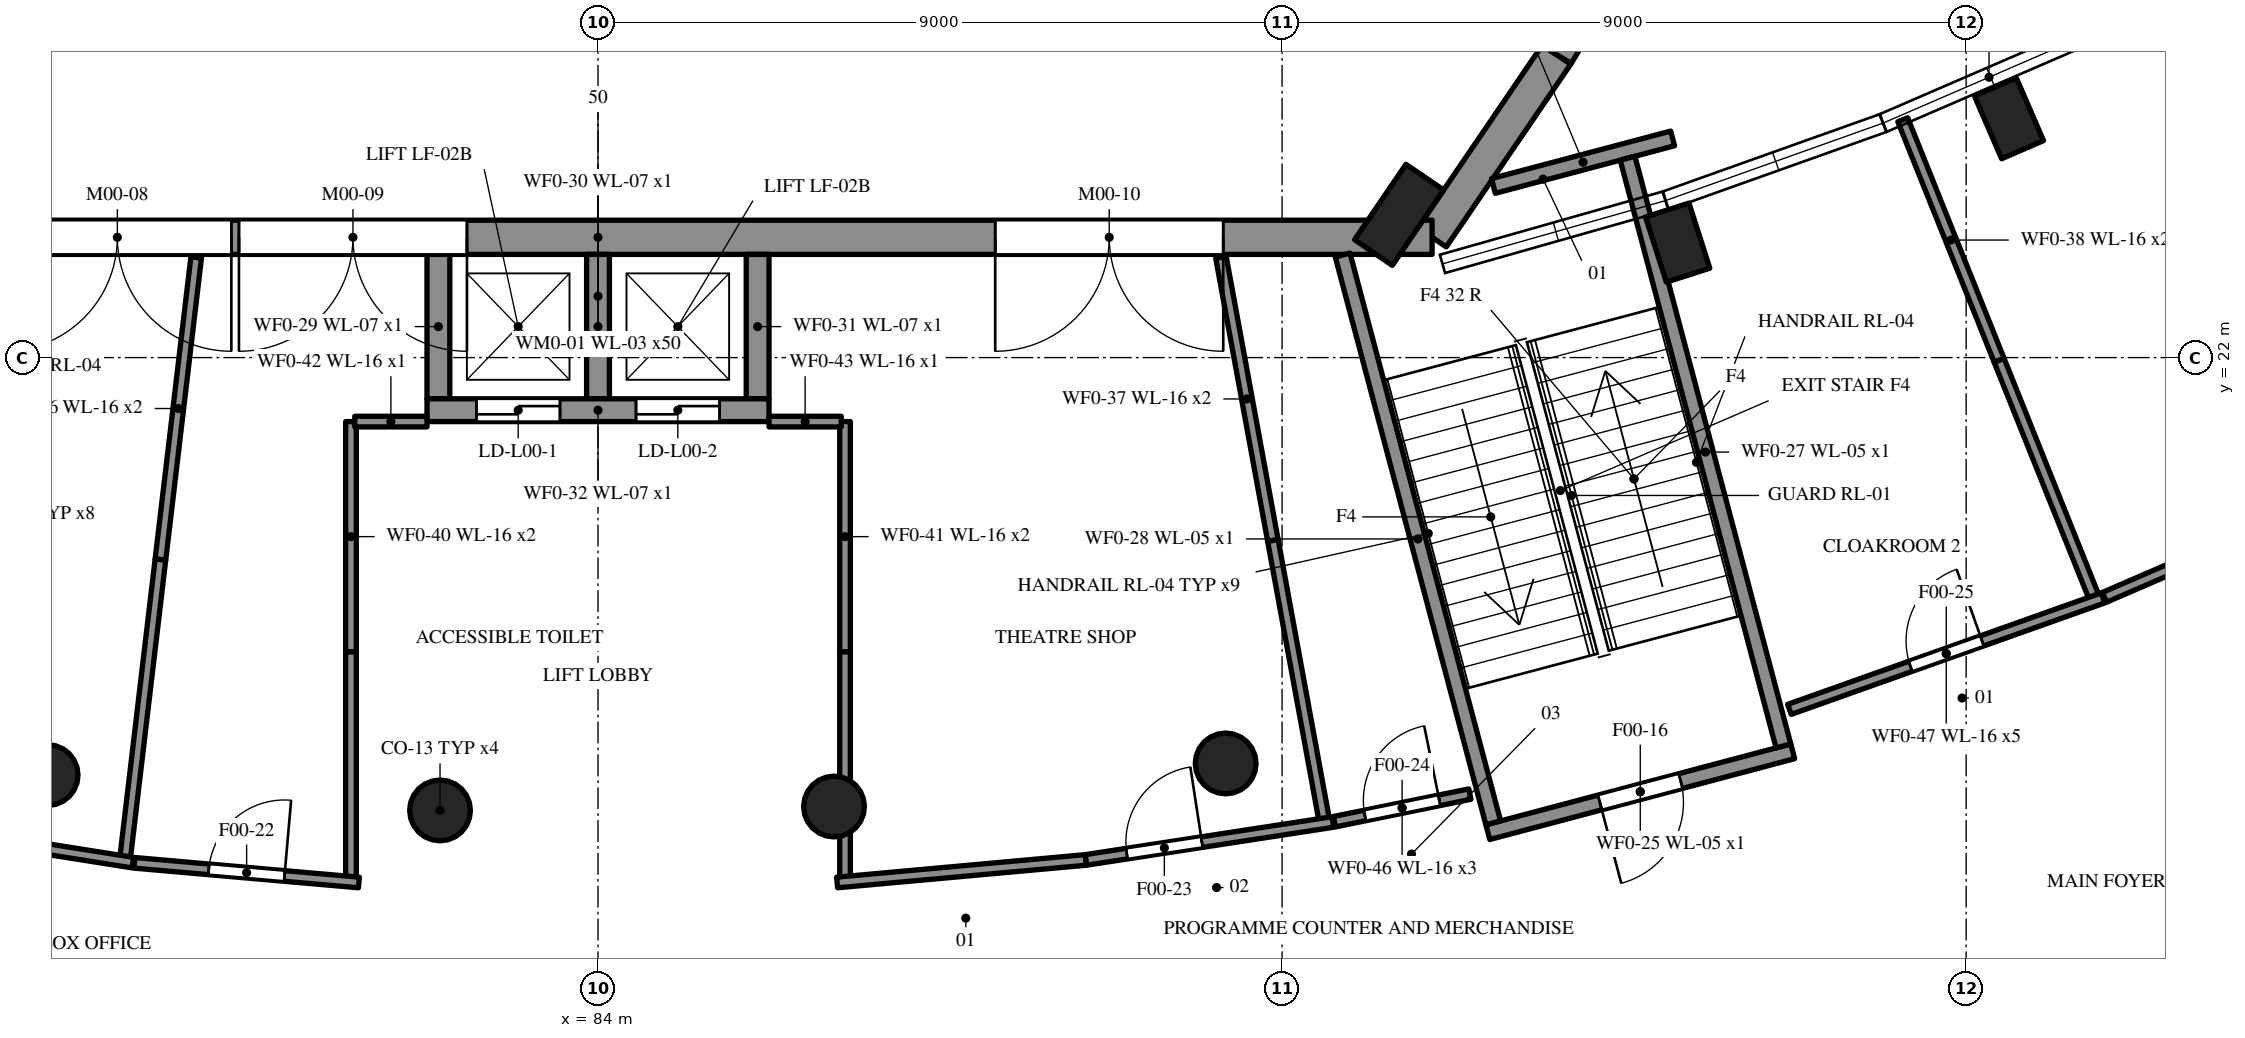
"""IFC4 building model, lengths in metres.
Left out: names, types, materials, properties, quantities, classifications, styles, units other than length and angle.
Written with IfcOpenShell. Run it as: python <this file> out.ifc"""

import sys

from ifc_helpers import new_model, si_unit, direction, frame, frame_2d, origin, origin_2d, place, context, subcontext, project, spatial, rectangle, circle, extrude, element, fill, save


model = new_model("IFC4")
c1 = context("Model", 3, precision=1e-05, world=origin(), true_north=direction((0.0, 1.0)))
c2 = subcontext(c1, "Body", "Model", "MODEL_VIEW")
j1 = project(units=[si_unit("LENGTHUNIT", "METRE"), si_unit("PLANEANGLEUNIT", "RADIAN")], contexts=[c1])
p1 = place(None, origin())
s1 = spatial("IfcSite", under=j1, at=p1, CompositionType="ELEMENT")
p2 = place(p1, origin())
s2 = spatial("IfcBuilding", under=s1, at=p2, CompositionType="ELEMENT")
p3 = place(p2, origin())
s3 = spatial("IfcBuildingStorey", under=s2, at=p3, CompositionType="ELEMENT", Elevation=0.0)
p4 = place(p3, frame((94.974, 23.583, 0.0), z_axis=(0.0, 0.0, 1.0), x_axis=(0.5629642644, 0.826481238147, 0.0)))
e1 = element("IfcWall", 1, at=p4, inside=s3, PredefinedType="SOLIDWALL", context=c2, shape_type="SweptSolid", body=[
    extrude(rectangle(XDim=2.908, YDim=0.45, at=frame_2d((1.454, 0.0))), origin(), (0.0, 0.0, 1.0), 5.4),
])
p5 = place(p3, frame((96.611, 25.986, 0.0), z_axis=(0.0, 0.0, 1.0), x_axis=(0.515636119523, 0.856807675177, 0.0)))
e2 = element("IfcWall", 2, at=p5, inside=s3, PredefinedType="SOLIDWALL", context=c2, shape_type="SweptSolid", body=[
    extrude(rectangle(XDim=3.021, YDim=0.45, at=frame_2d((1.511, 0.0))), origin(), (0.0, 0.0, 1.0), 5.4),
])
p6 = place(p3, frame((73.026, 23.583, 0.0), z_axis=(0.0, 0.0, 1.0), x_axis=(1.0, 0.0, 0.0)))
e3 = element("IfcWall", 3, at=p6, inside=s3, PredefinedType="SOLIDWALL", context=c2, shape_type="SweptSolid", body=[
    extrude(rectangle(XDim=21.948, YDim=0.45, at=frame_2d((10.974, 0.0))), origin(), (0.0, 0.0, 1.0), 5.4),
])
p7 = place(p6, frame((3.15, 0.0, 0.0)))
e4 = element("IfcOpeningElement", 4, at=p7, cuts=e3, PredefinedType="OPENING", context=c2, shape_type="SweptSolid", body=[
    extrude(rectangle(XDim=3.0, YDim=3.0, at=frame_2d((1.5, 1.5))), frame((0.0, 0.235, 0.0), z_axis=(0.0, -1.0, 0.0), x_axis=(1.0, 0.0, 0.0)), (0.0, 0.0, 1.0), 0.47),
])
p8 = place(p6, frame((6.25, 0.0, 0.0)))
e5 = element("IfcOpeningElement", 5, at=p8, cuts=e3, PredefinedType="OPENING", context=c2, shape_type="SweptSolid", body=[
    extrude(rectangle(XDim=3.0, YDim=3.0, at=frame_2d((1.5, 1.5))), frame((0.0, 0.235, 0.0), z_axis=(0.0, -1.0, 0.0), x_axis=(1.0, 0.0, 0.0)), (0.0, 0.0, 1.0), 0.47),
])
p9 = place(p6, frame((16.2, 0.0, 0.0)))
e6 = element("IfcOpeningElement", 6, at=p9, cuts=e3, PredefinedType="OPENING", context=c2, shape_type="SweptSolid", body=[
    extrude(rectangle(XDim=3.0, YDim=3.0, at=frame_2d((1.5, 1.5))), frame((0.0, 0.235, 0.0), z_axis=(0.0, -1.0, 0.0), x_axis=(1.0, 0.0, 0.0)), (0.0, 0.0, 1.0), 0.47),
])
p10 = place(p3, frame((94.54, 23.878, 0.0), z_axis=(0.0, 0.0, 1.0), x_axis=(0.562978035902, 0.82647185741, 0.0)))
e7 = element("IfcColumn", 7, at=p10, inside=s3, PredefinedType="PILASTER", context=c2, shape_type="SweptSolid", body=[
    extrude(rectangle(XDim=1.2, YDim=0.6, at=origin_2d()), origin(), (0.0, 0.0, 1.0), 5.4),
])
for number, where, z_axis, x_axis in (
    (8, (98.205, 23.513, 0.0), (0.0, 0.0, 1.0), (0.304, -0.953, 0.0)),
    (9, (102.563, 25.148, 0.0), (0.0, 0.0, 1.0), (0.398, -0.918, 0.0)),
):
    element("IfcColumn", number, at=place(p3, frame(where, z_axis=z_axis, x_axis=x_axis)), inside=s3, PredefinedType="PILASTER", context=c2, shape_type="SweptSolid", body=[
        extrude(rectangle(XDim=0.9, YDim=0.6, at=origin_2d()), origin(), (0.0, 0.0, 1.0), 5.4),
    ])
for number, where, z_axis, x_axis in (
    (10, (76.759, 16.507, 0.0), (0.0, 0.0, 1.0), (1.0, 0.0, 0.0)),
    (11, (81.922, 16.042, 0.0), (0.0, 0.0, 1.0), (1.0, 0.0, 0.0)),
    (12, (87.105, 16.093, 0.0), (0.0, 0.0, 1.0), (1.0, 0.0, 0.0)),
    (13, (92.258, 16.66, 0.0), (0.0, 0.0, 1.0), (1.0, 0.0, 0.0)),
):
    element("IfcColumn", number, at=place(p3, frame(where, z_axis=z_axis, x_axis=x_axis)), inside=s3, PredefinedType="COLUMN", context=c2, shape_type="SweptSolid", body=[
        extrude(circle(Radius=0.4, at=origin_2d()), origin(), (0.0, 0.0, 1.0), 5.4),
    ])
p11 = place(p3, frame((99.718, 16.819, 0.0), z_axis=(0.0, 0.0, 1.0), x_axis=(-0.966590417756, -0.256325894715, 0.0)))
e14 = element("IfcWall", 14, at=p11, inside=s3, PredefinedType="SHEAR", context=c2, shape_type="SweptSolid", body=[
    extrude(rectangle(XDim=4.15, YDim=0.2, at=frame_2d((2.075, 0.0))), origin(), (0.0, 0.0, 1.0), 5.4),
])
p12 = place(p11, frame((1.525, 0.0, 0.0)))
e15 = element("IfcOpeningElement", 15, at=p12, cuts=e14, PredefinedType="OPENING", context=c2, shape_type="SweptSolid", body=[
    extrude(rectangle(XDim=1.1, YDim=2.1, at=frame_2d((0.55, 1.05))), frame((0.0, 0.11, 0.0), z_axis=(0.0, -1.0, 0.0), x_axis=(1.0, 0.0, 0.0)), (0.0, 0.0, 1.0), 0.22),
])
p13 = place(p3, frame((98.138, 24.884, 0.0), z_axis=(0.0, 0.0, 1.0), x_axis=(-0.966582812495, -0.256354572009, 0.0)))
e16 = element("IfcWall", 16, at=p13, inside=s3, PredefinedType="SHEAR", context=c2, shape_type="SweptSolid", body=[
    extrude(rectangle(XDim=2.44, YDim=0.2, at=frame_2d((1.22, 0.0))), origin(), (0.0, 0.0, 1.0), 5.4),
])
p14 = place(p3, frame((99.596, 16.89, 0.0), z_axis=(0.0, 0.0, 1.0), x_axis=(-0.25631948932, 0.966592116352, 0.0)))
e17 = element("IfcWall", 17, at=p14, inside=s3, PredefinedType="SHEAR", context=c2, shape_type="SweptSolid", body=[
    extrude(rectangle(XDim=8.0, YDim=0.2, at=frame_2d((4.0, 0.0))), origin(), (0.0, 0.0, 1.0), 5.4),
])
p15 = place(p3, frame((95.778, 15.878, 0.0), z_axis=(0.0, 0.0, 1.0), x_axis=(-0.256333531377, 0.966588392591, 0.0)))
e18 = element("IfcWall", 18, at=p15, inside=s3, PredefinedType="SHEAR", context=c2, shape_type="SweptSolid", body=[
    extrude(rectangle(XDim=7.73, YDim=0.2, at=frame_2d((3.865, 0.0))), origin(), (0.0, 0.0, 1.0), 5.4),
])
for number, where, z_axis, x_axis in (
    (19, (81.9, 21.458, -1.1), (0.0, 0.0, 1.0), (0.0, 1.0, 0.0)),
    (20, (84.0, 21.458, -1.1), (0.0, 0.0, 1.0), (0.0, 1.0, 0.0)),
    (21, (86.1, 21.458, -1.1), (0.0, 0.0, 1.0), (0.0, 1.0, 0.0)),
):
    element("IfcWall", number, at=place(p3, frame(where, z_axis=z_axis, x_axis=x_axis)), inside=s3, PredefinedType="SHEAR", context=c2, shape_type="SweptSolid", body=[
        extrude(rectangle(XDim=1.9, YDim=0.3, at=frame_2d((0.95, 0.0))), origin(), (0.0, 0.0, 1.0), 6.5),
    ])
p16 = place(p3, frame((81.75, 21.308, -1.1), z_axis=(0.0, 0.0, 1.0), x_axis=(1.0, 0.0, 0.0)))
e22 = element("IfcWall", 22, at=p16, inside=s3, PredefinedType="SHEAR", context=c2, shape_type="SweptSolid", body=[
    extrude(rectangle(XDim=4.5, YDim=0.3, at=frame_2d((2.25, 0.0))), origin(), (0.0, 0.0, 1.0), 6.5),
])
p17 = place(p16, frame((0.65, 0.0, 1.1)))
e23 = element("IfcOpeningElement", 23, at=p17, cuts=e22, PredefinedType="OPENING", context=c2, shape_type="SweptSolid", body=[
    extrude(rectangle(XDim=1.1, YDim=2.2, at=frame_2d((0.55, 1.1))), frame((0.0, 0.16, 0.0), z_axis=(0.0, -1.0, 0.0), x_axis=(1.0, 0.0, 0.0)), (0.0, 0.0, 1.0), 0.32),
])
p18 = place(p16, frame((2.75, 0.0, 1.1)))
e24 = element("IfcOpeningElement", 24, at=p18, cuts=e22, PredefinedType="OPENING", context=c2, shape_type="SweptSolid", body=[
    extrude(rectangle(XDim=1.1, YDim=2.2, at=frame_2d((0.55, 1.1))), frame((0.0, 0.16, 0.0), z_axis=(0.0, -1.0, 0.0), x_axis=(1.0, 0.0, 0.0)), (0.0, 0.0, 1.0), 0.32),
])
p19 = place(p3, frame((78.713, 23.318, 0.0), z_axis=(0.0, 0.0, 1.0), x_axis=(-0.117524162316, -0.993070023348, 0.0)))
e25 = element("IfcWall", 25, at=p19, inside=s3, PredefinedType="PARTITIONING", context=c2, shape_type="SweptSolid", body=[
    extrude(rectangle(XDim=4.003, YDim=0.14, at=frame_2d((2.001, 0.0))), origin(), (0.0, 0.0, 1.0), 5.18),
])
p20 = place(p3, frame((78.243, 19.342, 0.0), z_axis=(0.0, 0.0, 1.0), x_axis=(-0.117462752038, -0.993077288978, 0.0)))
e26 = element("IfcWall", 26, at=p20, inside=s3, PredefinedType="PARTITIONING", context=c2, shape_type="SweptSolid", body=[
    extrude(rectangle(XDim=3.943, YDim=0.14, at=frame_2d((1.971, 0.0))), origin(), (0.0, 0.0, 1.0), 5.18),
])
p21 = place(p3, frame((92.196, 23.318, 0.0), z_axis=(0.0, 0.0, 1.0), x_axis=(0.180428728445, -0.983588061107, 0.0)))
e27 = element("IfcWall", 27, at=p21, inside=s3, PredefinedType="PARTITIONING", context=c2, shape_type="SweptSolid", body=[
    extrude(rectangle(XDim=3.786, YDim=0.14, at=frame_2d((1.893, 0.0))), origin(), (0.0, 0.0, 1.0), 5.18),
])
p22 = place(p3, frame((92.879, 19.594, 0.0), z_axis=(0.0, 0.0, 1.0), x_axis=(0.18037858071, -0.983597258852, 0.0)))
e28 = element("IfcWall", 28, at=p22, inside=s3, PredefinedType="PARTITIONING", context=c2, shape_type="SweptSolid", body=[
    extrude(rectangle(XDim=3.726, YDim=0.14, at=frame_2d((1.863, 0.0))), origin(), (0.0, 0.0, 1.0), 5.18),
])
p23 = place(p3, frame((101.167, 25.129, 0.0), z_axis=(0.0, 0.0, 1.0), x_axis=(0.371736295653, -0.928338368535, 0.0)))
e29 = element("IfcWall", 29, at=p23, inside=s3, PredefinedType="PARTITIONING", context=c2, shape_type="SweptSolid", body=[
    extrude(rectangle(XDim=3.41, YDim=0.14, at=frame_2d((1.705, 0.0))), origin(), (0.0, 0.0, 1.0), 5.18),
])
p24 = place(p3, frame((102.434, 21.964, 0.0), z_axis=(0.0, 0.0, 1.0), x_axis=(0.371667085719, -0.928366079407, 0.0)))
e30 = element("IfcWall", 30, at=p24, inside=s3, PredefinedType="PARTITIONING", context=c2, shape_type="SweptSolid", body=[
    extrude(rectangle(XDim=3.35, YDim=0.14, at=frame_2d((1.675, 0.0))), origin(), (0.0, 0.0, 1.0), 5.18),
])
p25 = place(p3, frame((80.75, 15.163, 0.0), z_axis=(0.0, 0.0, 1.0), x_axis=(0.0, 1.0, 0.0)))
e31 = element("IfcWall", 31, at=p25, inside=s3, PredefinedType="PARTITIONING", context=c2, shape_type="SweptSolid", body=[
    extrude(rectangle(XDim=2.967, YDim=0.14, at=frame_2d((1.484, 0.0))), origin(), (0.0, 0.0, 1.0), 5.18),
])
p26 = place(p3, frame((80.75, 18.13, 0.0), z_axis=(0.0, 0.0, 1.0), x_axis=(0.0, 1.0, 0.0)))
e32 = element("IfcWall", 32, at=p26, inside=s3, PredefinedType="PARTITIONING", context=c2, shape_type="SweptSolid", body=[
    extrude(rectangle(XDim=3.027, YDim=0.14, at=frame_2d((1.514, 0.0))), origin(), (0.0, 0.0, 1.0), 5.18),
])
p27 = place(p3, frame((87.25, 15.163, 0.0), z_axis=(0.0, 0.0, 1.0), x_axis=(0.0, 1.0, 0.0)))
e33 = element("IfcWall", 33, at=p27, inside=s3, PredefinedType="PARTITIONING", context=c2, shape_type="SweptSolid", body=[
    extrude(rectangle(XDim=2.967, YDim=0.14, at=frame_2d((1.484, 0.0))), origin(), (0.0, 0.0, 1.0), 5.18),
])
p28 = place(p3, frame((87.25, 18.13, 0.0), z_axis=(0.0, 0.0, 1.0), x_axis=(0.0, 1.0, 0.0)))
e34 = element("IfcWall", 34, at=p28, inside=s3, PredefinedType="PARTITIONING", context=c2, shape_type="SweptSolid", body=[
    extrude(rectangle(XDim=3.027, YDim=0.14, at=frame_2d((1.514, 0.0))), origin(), (0.0, 0.0, 1.0), 5.18),
])
for number, where, z_axis, x_axis in (
    (35, (80.8, 21.158, 0.0), (0.0, 0.0, 1.0), (1.0, 0.0, 0.0)),
    (36, (86.25, 21.158, 0.0), (0.0, 0.0, 1.0), (1.0, 0.0, 0.0)),
):
    element("IfcWall", number, at=place(p3, frame(where, z_axis=z_axis, x_axis=x_axis)), inside=s3, PredefinedType="PARTITIONING", context=c2, shape_type="SweptSolid", body=[
        extrude(rectangle(XDim=0.95, YDim=0.14, at=frame_2d((0.475, 0.0))), origin(), (0.0, 0.0, 1.0), 5.18),
    ])
p29 = place(p3, frame((73.554, 16.04, 0.0), z_axis=(0.0, 0.0, 1.0), x_axis=(0.987693268679, -0.156403347173, 0.0)))
e37 = element("IfcWall", 37, at=p29, inside=s3, PredefinedType="PARTITIONING", context=c2, shape_type="SweptSolid", body=[
    extrude(rectangle(XDim=4.38, YDim=0.14, at=frame_2d((2.19, 0.0))), origin(), (0.0, 0.0, 1.0), 5.18),
])
p30 = place(p29, frame((1.59, 0.0, 0.0)))
e38 = element("IfcOpeningElement", 38, at=p30, cuts=e37, PredefinedType="OPENING", context=c2, shape_type="SweptSolid", body=[
    extrude(rectangle(XDim=1.0, YDim=2.1, at=frame_2d((0.5, 1.05))), frame((0.0, 0.08, 0.0), z_axis=(0.0, -1.0, 0.0), x_axis=(1.0, 0.0, 0.0)), (0.0, 0.0, 1.0), 0.16),
])
p31 = place(p3, frame((77.9, 15.352, 0.0), z_axis=(0.0, 0.0, 1.0), x_axis=(0.996183521579, -0.087283396667, 0.0)))
e39 = element("IfcWall", 39, at=p31, inside=s3, PredefinedType="PARTITIONING", context=c2, shape_type="SweptSolid", body=[
    extrude(rectangle(XDim=2.965, YDim=0.14, at=frame_2d((1.482, 0.0))), origin(), (0.0, 0.0, 1.0), 5.18),
])
p32 = place(p31, frame((0.982, 0.0, 0.0)))
e40 = element("IfcOpeningElement", 40, at=p32, cuts=e39, PredefinedType="OPENING", context=c2, shape_type="SweptSolid", body=[
    extrude(rectangle(XDim=1.0, YDim=2.1, at=frame_2d((0.5, 1.05))), frame((0.0, 0.08, 0.0), z_axis=(0.0, -1.0, 0.0), x_axis=(1.0, 0.0, 0.0)), (0.0, 0.0, 1.0), 0.16),
])
p33 = place(p3, frame((87.146, 15.094, 0.0), z_axis=(0.0, 0.0, 1.0), x_axis=(0.995913271916, 0.090314754169, 0.0)))
e41 = element("IfcWall", 41, at=p33, inside=s3, PredefinedType="PARTITIONING", context=c2, shape_type="SweptSolid", body=[
    extrude(rectangle(XDim=3.287, YDim=0.14, at=frame_2d((1.644, 0.0))), origin(), (0.0, 0.0, 1.0), 5.18),
])
p34 = place(p3, frame((90.42, 15.39, 0.0), z_axis=(0.0, 0.0, 1.0), x_axis=(0.988407735118, 0.151822755736, 0.0)))
e42 = element("IfcWall", 42, at=p34, inside=s3, PredefinedType="PARTITIONING", context=c2, shape_type="SweptSolid", body=[
    extrude(rectangle(XDim=3.287, YDim=0.14, at=frame_2d((1.644, 0.0))), origin(), (0.0, 0.0, 1.0), 5.18),
])
p35 = place(p34, frame((0.543, 0.0, 0.0)))
e43 = element("IfcOpeningElement", 43, at=p35, cuts=e42, PredefinedType="OPENING", context=c2, shape_type="SweptSolid", body=[
    extrude(rectangle(XDim=1.0, YDim=2.1, at=frame_2d((0.5, 1.05))), frame((0.0, 0.08, 0.0), z_axis=(0.0, -1.0, 0.0), x_axis=(1.0, 0.0, 0.0)), (0.0, 0.0, 1.0), 0.16),
])
p36 = place(p3, frame((93.688, 15.893, 0.0), z_axis=(0.0, 0.0, 1.0), x_axis=(0.979888212279, 0.199547216058, 0.0)))
e44 = element("IfcWall", 44, at=p36, inside=s3, PredefinedType="PARTITIONING", context=c2, shape_type="SweptSolid", body=[
    extrude(rectangle(XDim=1.819, YDim=0.14, at=frame_2d((0.91, 0.0))), origin(), (0.0, 0.0, 1.0), 5.18),
])
p37 = place(p36, frame((0.41, 0.0, 0.0)))
e45 = element("IfcOpeningElement", 45, at=p37, cuts=e44, PredefinedType="OPENING", context=c2, shape_type="SweptSolid", body=[
    extrude(rectangle(XDim=1.0, YDim=2.1, at=frame_2d((0.5, 1.05))), frame((0.0, 0.08, 0.0), z_axis=(0.0, -1.0, 0.0), x_axis=(1.0, 0.0, 0.0)), (0.0, 0.0, 1.0), 0.16),
])
p38 = place(p3, frame((99.675, 17.371, 0.0), z_axis=(0.0, 0.0, 1.0), x_axis=(0.942230332433, 0.334965670844, 0.0)))
e46 = element("IfcWall", 46, at=p38, inside=s3, PredefinedType="PARTITIONING", context=c2, shape_type="SweptSolid", body=[
    extrude(rectangle(XDim=4.379, YDim=0.14, at=frame_2d((2.189, 0.0))), origin(), (0.0, 0.0, 1.0), 5.18),
])
p39 = place(p38, frame((1.689, 0.0, 0.0)))
e47 = element("IfcOpeningElement", 47, at=p39, cuts=e46, PredefinedType="OPENING", context=c2, shape_type="SweptSolid", body=[
    extrude(rectangle(XDim=1.0, YDim=2.1, at=frame_2d((0.5, 1.05))), frame((0.0, 0.08, 0.0), z_axis=(0.0, -1.0, 0.0), x_axis=(1.0, 0.0, 0.0)), (0.0, 0.0, 1.0), 0.16),
])
p40 = place(p3, frame((103.82, 18.845, 0.0), z_axis=(0.0, 0.0, 1.0), x_axis=(0.917837897993, 0.396955404305, 0.0)))
e48 = element("IfcWall", 48, at=p40, inside=s3, PredefinedType="PARTITIONING", context=c2, shape_type="SweptSolid", body=[
    extrude(rectangle(XDim=2.638, YDim=0.14, at=frame_2d((1.319, 0.0))), origin(), (0.0, 0.0, 1.0), 5.18),
])
p41 = place(p7, frame((3.0, 0.0, 0.0), z_axis=(0.0, 0.0, 1.0), x_axis=(-1.0, 0.0, 0.0)))
e49 = element("IfcDoor", 49, at=p41, inside=s3, OperationType="DOUBLE_DOOR_SINGLE_SWING", PredefinedType="DOOR", context=c2, shape_type="SweptSolid", body=[
    extrude(rectangle(XDim=3.0, YDim=3.0, at=frame_2d((1.5, 1.5))), frame((0.0, 0.025, 0.0), z_axis=(0.0, -1.0, 0.0), x_axis=(1.0, 0.0, 0.0)), (0.0, 0.0, 1.0), 0.05),
])
fill(e4, e49)
p42 = place(p8, frame((3.0, 0.0, 0.0), z_axis=(0.0, 0.0, 1.0), x_axis=(-1.0, 0.0, 0.0)))
e50 = element("IfcDoor", 50, at=p42, inside=s3, OperationType="DOUBLE_DOOR_SINGLE_SWING", PredefinedType="DOOR", context=c2, shape_type="SweptSolid", body=[
    extrude(rectangle(XDim=3.0, YDim=3.0, at=frame_2d((1.5, 1.5))), frame((0.0, 0.025, 0.0), z_axis=(0.0, -1.0, 0.0), x_axis=(1.0, 0.0, 0.0)), (0.0, 0.0, 1.0), 0.05),
])
fill(e5, e50)
p43 = place(p9, frame((3.0, 0.0, 0.0), z_axis=(0.0, 0.0, 1.0), x_axis=(-1.0, 0.0, 0.0)))
e51 = element("IfcDoor", 51, at=p43, inside=s3, OperationType="DOUBLE_DOOR_SINGLE_SWING", PredefinedType="DOOR", context=c2, shape_type="SweptSolid", body=[
    extrude(rectangle(XDim=3.0, YDim=3.0, at=frame_2d((1.5, 1.5))), frame((0.0, 0.025, 0.0), z_axis=(0.0, -1.0, 0.0), x_axis=(1.0, 0.0, 0.0)), (0.0, 0.0, 1.0), 0.05),
])
fill(e6, e51)
p44 = place(p12, origin())
e52 = element("IfcDoor", 52, at=p44, inside=s3, OperationType="SINGLE_SWING_RIGHT", PredefinedType="DOOR", context=c2, shape_type="SweptSolid", body=[
    extrude(rectangle(XDim=1.1, YDim=2.1, at=frame_2d((0.55, 1.05))), frame((0.0, 0.025, 0.0), z_axis=(0.0, -1.0, 0.0), x_axis=(1.0, 0.0, 0.0)), (0.0, 0.0, 1.0), 0.05),
])
fill(e15, e52)
p45 = place(p17, origin())
e53 = element("IfcDoor", 53, at=p45, inside=s3, OperationType="SLIDING_TO_LEFT", PredefinedType="DOOR", context=c2, shape_type="SweptSolid", body=[
    extrude(rectangle(XDim=1.1, YDim=2.2, at=frame_2d((0.55, 1.1))), frame((0.0, 0.025, 0.0), z_axis=(0.0, -1.0, 0.0), x_axis=(1.0, 0.0, 0.0)), (0.0, 0.0, 1.0), 0.05),
])
fill(e23, e53)
p46 = place(p18, origin())
e54 = element("IfcDoor", 54, at=p46, inside=s3, OperationType="SLIDING_TO_LEFT", PredefinedType="DOOR", context=c2, shape_type="SweptSolid", body=[
    extrude(rectangle(XDim=1.1, YDim=2.2, at=frame_2d((0.55, 1.1))), frame((0.0, 0.025, 0.0), z_axis=(0.0, -1.0, 0.0), x_axis=(1.0, 0.0, 0.0)), (0.0, 0.0, 1.0), 0.05),
])
fill(e24, e54)
p47 = place(p32, origin())
e55 = element("IfcDoor", 55, at=p47, inside=s3, OperationType="SINGLE_SWING_RIGHT", PredefinedType="DOOR", context=c2, shape_type="SweptSolid", body=[
    extrude(rectangle(XDim=1.0, YDim=2.1, at=frame_2d((0.5, 1.05))), frame((0.0, 0.025, 0.0), z_axis=(0.0, -1.0, 0.0), x_axis=(1.0, 0.0, 0.0)), (0.0, 0.0, 1.0), 0.05),
])
fill(e40, e55)
p48 = place(p35, origin())
e56 = element("IfcDoor", 56, at=p48, inside=s3, OperationType="SINGLE_SWING_RIGHT", PredefinedType="DOOR", context=c2, shape_type="SweptSolid", body=[
    extrude(rectangle(XDim=1.0, YDim=2.1, at=frame_2d((0.5, 1.05))), frame((0.0, 0.025, 0.0), z_axis=(0.0, -1.0, 0.0), x_axis=(1.0, 0.0, 0.0)), (0.0, 0.0, 1.0), 0.05),
])
fill(e43, e56)
p49 = place(p37, origin())
e57 = element("IfcDoor", 57, at=p49, inside=s3, OperationType="SINGLE_SWING_RIGHT", PredefinedType="DOOR", context=c2, shape_type="SweptSolid", body=[
    extrude(rectangle(XDim=1.0, YDim=2.1, at=frame_2d((0.5, 1.05))), frame((0.0, 0.025, 0.0), z_axis=(0.0, -1.0, 0.0), x_axis=(1.0, 0.0, 0.0)), (0.0, 0.0, 1.0), 0.05),
])
fill(e45, e57)
p50 = place(p39, origin())
e58 = element("IfcDoor", 58, at=p50, inside=s3, OperationType="SINGLE_SWING_RIGHT", PredefinedType="DOOR", context=c2, shape_type="SweptSolid", body=[
    extrude(rectangle(XDim=1.0, YDim=2.1, at=frame_2d((0.5, 1.05))), frame((0.0, 0.025, 0.0), z_axis=(0.0, -1.0, 0.0), x_axis=(1.0, 0.0, 0.0)), (0.0, 0.0, 1.0), 0.05),
])
fill(e47, e58)
save(model, sys.argv[1])
